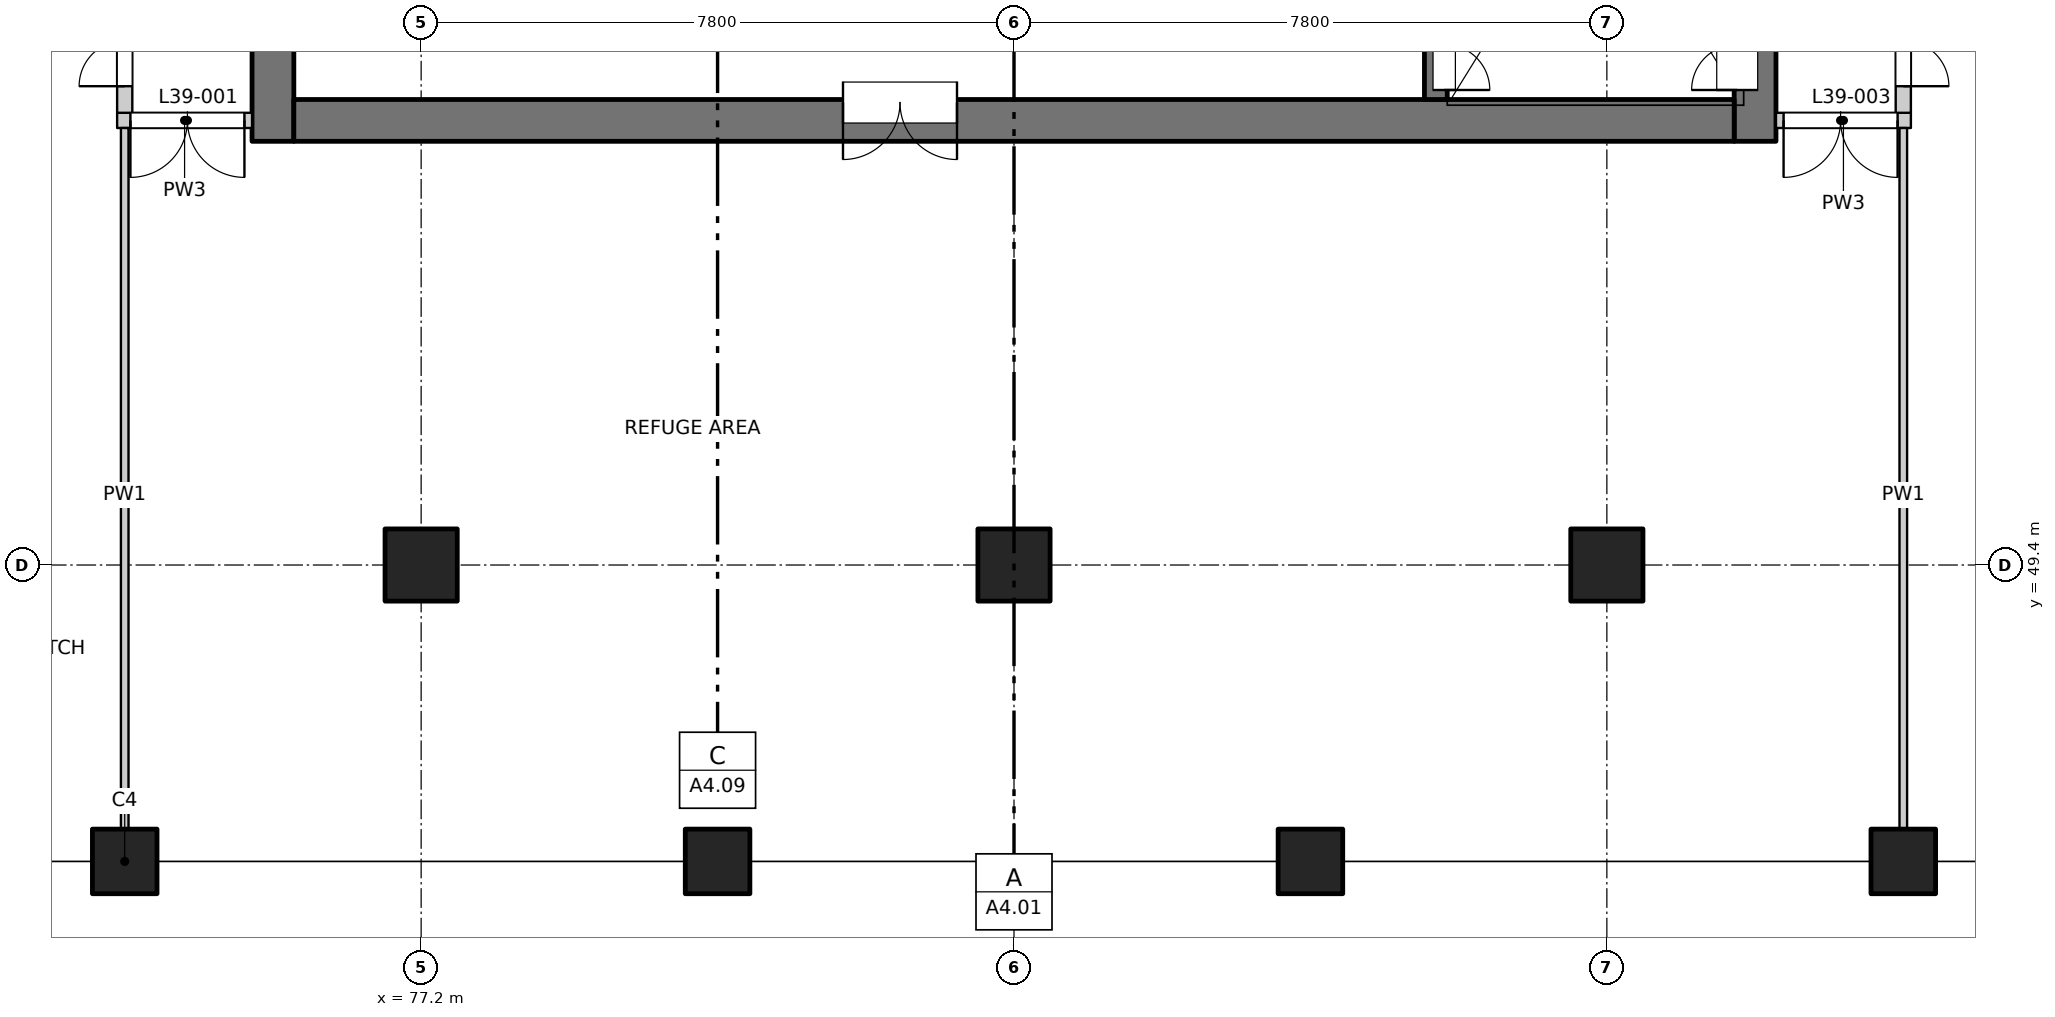
"""IFC4 building model, lengths in metres.
Left out: names, types, materials, properties, quantities, classifications, styles, units other than length and angle.
Written with IfcOpenShell. Run it as: python <this file> out.ifc"""

import sys

from ifc_helpers import new_model, si_unit, direction, frame, frame_2d, origin, origin_2d, place, context, subcontext, project, spatial, rectangle, extrude, element, fill, save


model = new_model("IFC4")
c1 = context("Model", 3, precision=1e-05, world=origin(), true_north=direction((0.0, 1.0)))
c2 = subcontext(c1, "Body", "Model", "MODEL_VIEW")
j1 = project(units=[si_unit("LENGTHUNIT", "METRE"), si_unit("PLANEANGLEUNIT", "RADIAN")], contexts=[c1])
p1 = place(None, origin())
s1 = spatial("IfcSite", under=j1, at=p1, CompositionType="ELEMENT")
p2 = place(p1, origin())
s2 = spatial("IfcBuilding", under=s1, at=p2, CompositionType="ELEMENT")
p3 = place(p2, frame((0.0, 0.0, 144.1)))
s3 = spatial("IfcBuildingStorey", under=s2, at=p3, CompositionType="ELEMENT", Elevation=144.1)
for number, where, z_axis, x_axis in (
    (1, (73.3, 45.5, -0.3), (0.0, 0.0, 1.0), (1.0, 0.0, 0.0)),
    (2, (81.1, 45.5, -0.3), (0.0, 0.0, 1.0), (1.0, 0.0, 0.0)),
    (3, (88.9, 45.5, -0.3), (0.0, 0.0, 1.0), (1.0, 0.0, 0.0)),
    (4, (96.7, 45.5, -0.3), (0.0, 0.0, 1.0), (1.0, 0.0, 0.0)),
):
    element("IfcColumn", number, at=place(p3, frame(where, z_axis=z_axis, x_axis=x_axis)), inside=s3, PredefinedType="COLUMN", context=c2, shape_type="SweptSolid", body=[
        extrude(rectangle(XDim=0.85, YDim=0.85, at=origin_2d()), origin(), (0.0, 0.0, 1.0), 4.5),
    ])
for number, where, z_axis, x_axis in (
    (5, (77.2, 49.4, -0.3), (0.0, 0.0, 1.0), (1.0, 0.0, 0.0)),
    (6, (85.0, 49.4, -0.3), (0.0, 0.0, 1.0), (1.0, 0.0, 0.0)),
    (7, (92.8, 49.4, -0.3), (0.0, 0.0, 1.0), (1.0, 0.0, 0.0)),
):
    element("IfcColumn", number, at=place(p3, frame(where, z_axis=z_axis, x_axis=x_axis)), inside=s3, PredefinedType="COLUMN", context=c2, shape_type="SweptSolid", body=[
        extrude(rectangle(XDim=0.95, YDim=0.95, at=origin_2d()), origin(), (0.0, 0.0, 1.0), 4.5),
    ])
p4 = place(p3, frame((75.25, 54.975, -0.3), z_axis=(0.0, 0.0, 1.0), x_axis=(0.0, 1.0, 0.0)))
e8 = element("IfcWall", 8, at=p4, inside=s3, PredefinedType="SOLIDWALL", context=c2, shape_type="SweptSolid", body=[
    extrude(rectangle(XDim=22.325, YDim=0.55, at=frame_2d((11.163, 0.0))), origin(), (0.0, 0.0, 1.0), 4.5),
])
p5 = place(p4, frame((7.475, 0.0, 0.3)))
e9 = element("IfcOpeningElement", 9, at=p5, cuts=e8, PredefinedType="OPENING", context=c2, shape_type="SweptSolid", body=[
    extrude(rectangle(XDim=0.9, YDim=2.1, at=frame_2d((0.45, 1.05))), frame((0.0, 0.285, 0.0), z_axis=(0.0, -1.0, 0.0), x_axis=(1.0, 0.0, 0.0)), (0.0, 0.0, 1.0), 0.57),
])
p6 = place(p4, frame((12.125, 0.0, 0.3)))
e10 = element("IfcOpeningElement", 10, at=p6, cuts=e8, PredefinedType="OPENING", context=c2, shape_type="SweptSolid", body=[
    extrude(rectangle(XDim=0.9, YDim=2.1, at=frame_2d((0.45, 1.05))), frame((0.0, 0.285, 0.0), z_axis=(0.0, -1.0, 0.0), x_axis=(1.0, 0.0, 0.0)), (0.0, 0.0, 1.0), 0.57),
])
p7 = place(p4, frame((16.625, 0.0, 0.3)))
e11 = element("IfcOpeningElement", 11, at=p7, cuts=e8, PredefinedType="OPENING", context=c2, shape_type="SweptSolid", body=[
    extrude(rectangle(XDim=0.9, YDim=2.1, at=frame_2d((0.45, 1.05))), frame((0.0, 0.285, 0.0), z_axis=(0.0, -1.0, 0.0), x_axis=(1.0, 0.0, 0.0)), (0.0, 0.0, 1.0), 0.57),
])
p8 = place(p4, frame((20.075, 0.0, 0.3)))
e12 = element("IfcOpeningElement", 12, at=p8, cuts=e8, PredefinedType="OPENING", context=c2, shape_type="SweptSolid", body=[
    extrude(rectangle(XDim=0.9, YDim=2.1, at=frame_2d((0.45, 1.05))), frame((0.0, 0.285, 0.0), z_axis=(0.0, -1.0, 0.0), x_axis=(1.0, 0.0, 0.0)), (0.0, 0.0, 1.0), 0.57),
])
p9 = place(p3, frame((94.75, 54.975, -0.3), z_axis=(0.0, 0.0, 1.0), x_axis=(0.0, 1.0, 0.0)))
e13 = element("IfcWall", 13, at=p9, inside=s3, PredefinedType="SOLIDWALL", context=c2, shape_type="SweptSolid", body=[
    extrude(rectangle(XDim=6.975, YDim=0.55, at=frame_2d((3.487, 0.0))), origin(), (0.0, 0.0, 1.0), 4.5),
])
p10 = place(p9, frame((0.675, 0.0, 0.3)))
e14 = element("IfcOpeningElement", 14, at=p10, cuts=e13, PredefinedType="OPENING", context=c2, shape_type="SweptSolid", body=[
    extrude(rectangle(XDim=1.2, YDim=2.1, at=frame_2d((0.6, 1.05))), frame((0.0, 0.285, 0.0), z_axis=(0.0, -1.0, 0.0), x_axis=(1.0, 0.0, 0.0)), (0.0, 0.0, 1.0), 0.57),
])
p11 = place(p3, frame((75.525, 55.25, -0.3), z_axis=(0.0, 0.0, 1.0), x_axis=(1.0, 0.0, 0.0)))
e15 = element("IfcWall", 15, at=p11, inside=s3, PredefinedType="SOLIDWALL", context=c2, shape_type="SweptSolid", body=[
    extrude(rectangle(XDim=18.95, YDim=0.55, at=frame_2d((9.475, 0.0))), origin(), (0.0, 0.0, 1.0), 4.5),
])
p12 = place(p11, frame((7.225, 0.0, 0.3)))
e16 = element("IfcOpeningElement", 16, at=p12, cuts=e15, PredefinedType="OPENING", context=c2, shape_type="SweptSolid", body=[
    extrude(rectangle(XDim=1.5, YDim=2.1, at=frame_2d((0.75, 1.05))), frame((0.0, 0.285, 0.0), z_axis=(0.0, -1.0, 0.0), x_axis=(1.0, 0.0, 0.0)), (0.0, 0.0, 1.0), 0.57),
])
p13 = place(p3, frame((90.55, 55.525, -0.3), z_axis=(0.0, 0.0, 1.0), x_axis=(0.0, 1.0, 0.0)))
e17 = element("IfcWall", 17, at=p13, inside=s3, PredefinedType="SOLIDWALL", context=c2, shape_type="SweptSolid", body=[
    extrude(rectangle(XDim=6.425, YDim=0.3, at=frame_2d((3.212, 0.0))), origin(), (0.0, 0.0, 1.0), 4.5),
])
p14 = place(p13, frame((0.125, 0.0, 0.3)))
e18 = element("IfcOpeningElement", 18, at=p14, cuts=e17, PredefinedType="OPENING", context=c2, shape_type="SweptSolid", body=[
    extrude(rectangle(XDim=1.2, YDim=2.1, at=frame_2d((0.6, 1.05))), frame((0.0, 0.16, 0.0), z_axis=(0.0, -1.0, 0.0), x_axis=(1.0, 0.0, 0.0)), (0.0, 0.0, 1.0), 0.32),
])
p15 = place(p3, frame((73.2, 55.25, 0.0), z_axis=(0.0, 0.0, 1.0), x_axis=(1.0, 0.0, 0.0)))
e19 = element("IfcWall", 19, at=p15, inside=s3, PredefinedType="PARTITIONING", context=c2, shape_type="SweptSolid", body=[
    extrude(rectangle(XDim=1.775, YDim=0.2, at=frame_2d((0.887, 0.0))), origin(), (0.0, 0.0, 1.0), 4.2),
])
p16 = place(p15, frame((0.175, 0.0, 0.0)))
e20 = element("IfcOpeningElement", 20, at=p16, cuts=e19, PredefinedType="OPENING", context=c2, shape_type="SweptSolid", body=[
    extrude(rectangle(XDim=1.5, YDim=2.1, at=frame_2d((0.75, 1.05))), frame((0.0, 0.11, 0.0), z_axis=(0.0, -1.0, 0.0), x_axis=(1.0, 0.0, 0.0)), (0.0, 0.0, 1.0), 0.22),
])
p17 = place(p3, frame((95.025, 55.25, 0.0), z_axis=(0.0, 0.0, 1.0), x_axis=(1.0, 0.0, 0.0)))
e21 = element("IfcWall", 21, at=p17, inside=s3, PredefinedType="PARTITIONING", context=c2, shape_type="SweptSolid", body=[
    extrude(rectangle(XDim=1.775, YDim=0.2, at=frame_2d((0.887, 0.0))), origin(), (0.0, 0.0, 1.0), 4.2),
])
p18 = place(p17, frame((0.1, 0.0, 0.0)))
e22 = element("IfcOpeningElement", 22, at=p18, cuts=e21, PredefinedType="OPENING", context=c2, shape_type="SweptSolid", body=[
    extrude(rectangle(XDim=1.5, YDim=2.1, at=frame_2d((0.75, 1.05))), frame((0.0, 0.11, 0.0), z_axis=(0.0, -1.0, 0.0), x_axis=(1.0, 0.0, 0.0)), (0.0, 0.0, 1.0), 0.22),
])
p19 = place(p3, frame((73.3, 45.5, 0.0), z_axis=(0.0, 0.0, 1.0), x_axis=(0.0, 1.0, 0.0)))
e23 = element("IfcWall", 23, at=p19, inside=s3, PredefinedType="PARTITIONING", context=c2, shape_type="SweptSolid", body=[
    extrude(rectangle(XDim=9.65, YDim=0.1, at=frame_2d((4.825, 0.0))), origin(), (0.0, 0.0, 1.0), 4.2),
])
p20 = place(p3, frame((73.3, 55.35, 0.0), z_axis=(0.0, 0.0, 1.0), x_axis=(0.0, 1.0, 0.0)))
e24 = element("IfcWall", 24, at=p20, inside=s3, PredefinedType="PARTITIONING", context=c2, shape_type="SweptSolid", body=[
    extrude(rectangle(XDim=29.15, YDim=0.2, at=frame_2d((14.575, 0.0))), origin(), (0.0, 0.0, 1.0), 4.2),
])
p21 = place(p20, frame((0.35, 0.0, 0.0)))
e25 = element("IfcOpeningElement", 25, at=p21, cuts=e24, PredefinedType="OPENING", context=c2, shape_type="SweptSolid", body=[
    extrude(rectangle(XDim=1.2, YDim=2.1, at=frame_2d((0.6, 1.05))), frame((0.0, 0.11, 0.0), z_axis=(0.0, -1.0, 0.0), x_axis=(1.0, 0.0, 0.0)), (0.0, 0.0, 1.0), 0.22),
])
p22 = place(p20, frame((3.2, 0.0, 0.0)))
e26 = element("IfcOpeningElement", 26, at=p22, cuts=e24, PredefinedType="OPENING", context=c2, shape_type="SweptSolid", body=[
    extrude(rectangle(XDim=1.2, YDim=2.1, at=frame_2d((0.6, 1.05))), frame((0.0, 0.11, 0.0), z_axis=(0.0, -1.0, 0.0), x_axis=(1.0, 0.0, 0.0)), (0.0, 0.0, 1.0), 0.22),
])
p23 = place(p20, frame((22.7, 0.0, 0.0)))
e27 = element("IfcOpeningElement", 27, at=p23, cuts=e24, PredefinedType="OPENING", context=c2, shape_type="SweptSolid", body=[
    extrude(rectangle(XDim=1.2, YDim=2.1, at=frame_2d((0.6, 1.05))), frame((0.0, 0.11, 0.0), z_axis=(0.0, -1.0, 0.0), x_axis=(1.0, 0.0, 0.0)), (0.0, 0.0, 1.0), 0.22),
])
p24 = place(p20, frame((26.6, 0.0, 0.0)))
e28 = element("IfcOpeningElement", 28, at=p24, cuts=e24, PredefinedType="OPENING", context=c2, shape_type="SweptSolid", body=[
    extrude(rectangle(XDim=1.2, YDim=2.1, at=frame_2d((0.6, 1.05))), frame((0.0, 0.11, 0.0), z_axis=(0.0, -1.0, 0.0), x_axis=(1.0, 0.0, 0.0)), (0.0, 0.0, 1.0), 0.22),
])
p25 = place(p3, frame((96.7, 45.5, 0.0), z_axis=(0.0, 0.0, 1.0), x_axis=(0.0, 1.0, 0.0)))
e29 = element("IfcWall", 29, at=p25, inside=s3, PredefinedType="PARTITIONING", context=c2, shape_type="SweptSolid", body=[
    extrude(rectangle(XDim=9.65, YDim=0.1, at=frame_2d((4.825, 0.0))), origin(), (0.0, 0.0, 1.0), 4.2),
])
p26 = place(p3, frame((96.7, 55.35, 0.0), z_axis=(0.0, 0.0, 1.0), x_axis=(0.0, 1.0, 0.0)))
e30 = element("IfcWall", 30, at=p26, inside=s3, PredefinedType="PARTITIONING", context=c2, shape_type="SweptSolid", body=[
    extrude(rectangle(XDim=29.15, YDim=0.2, at=frame_2d((14.575, 0.0))), origin(), (0.0, 0.0, 1.0), 4.2),
])
p27 = place(p26, frame((0.35, 0.0, 0.0)))
e31 = element("IfcOpeningElement", 31, at=p27, cuts=e30, PredefinedType="OPENING", context=c2, shape_type="SweptSolid", body=[
    extrude(rectangle(XDim=1.2, YDim=2.1, at=frame_2d((0.6, 1.05))), frame((0.0, 0.11, 0.0), z_axis=(0.0, -1.0, 0.0), x_axis=(1.0, 0.0, 0.0)), (0.0, 0.0, 1.0), 0.22),
])
p28 = place(p26, frame((3.2, 0.0, 0.0)))
e32 = element("IfcOpeningElement", 32, at=p28, cuts=e30, PredefinedType="OPENING", context=c2, shape_type="SweptSolid", body=[
    extrude(rectangle(XDim=1.2, YDim=2.1, at=frame_2d((0.6, 1.05))), frame((0.0, 0.11, 0.0), z_axis=(0.0, -1.0, 0.0), x_axis=(1.0, 0.0, 0.0)), (0.0, 0.0, 1.0), 0.22),
])
p29 = place(p26, frame((14.9, 0.0, 0.0)))
e33 = element("IfcOpeningElement", 33, at=p29, cuts=e30, PredefinedType="OPENING", context=c2, shape_type="SweptSolid", body=[
    extrude(rectangle(XDim=1.2, YDim=2.1, at=frame_2d((0.6, 1.05))), frame((0.0, 0.11, 0.0), z_axis=(0.0, -1.0, 0.0), x_axis=(1.0, 0.0, 0.0)), (0.0, 0.0, 1.0), 0.22),
])
p30 = place(p26, frame((26.6, 0.0, 0.0)))
e34 = element("IfcOpeningElement", 34, at=p30, cuts=e30, PredefinedType="OPENING", context=c2, shape_type="SweptSolid", body=[
    extrude(rectangle(XDim=1.2, YDim=2.1, at=frame_2d((0.6, 1.05))), frame((0.0, 0.11, 0.0), z_axis=(0.0, -1.0, 0.0), x_axis=(1.0, 0.0, 0.0)), (0.0, 0.0, 1.0), 0.22),
])
p31 = place(p16, origin())
e35 = element("IfcDoor", 35, at=p31, inside=s3, OperationType="DOUBLE_DOOR_SINGLE_SWING", PredefinedType="DOOR", context=c2, shape_type="SweptSolid", body=[
    extrude(rectangle(XDim=1.5, YDim=2.1, at=frame_2d((0.75, 1.05))), frame((0.0, 0.025, 0.0), z_axis=(0.0, -1.0, 0.0), x_axis=(1.0, 0.0, 0.0)), (0.0, 0.0, 1.0), 0.05),
])
fill(e20, e35)
p32 = place(p12, origin())
e36 = element("IfcDoor", 36, at=p32, inside=s3, OperationType="DOUBLE_DOOR_SINGLE_SWING", PredefinedType="DOOR", context=c2, shape_type="SweptSolid", body=[
    extrude(rectangle(XDim=1.5, YDim=2.1, at=frame_2d((0.75, 1.05))), frame((0.0, 0.26, 0.0), z_axis=(0.0, -1.0, 0.0), x_axis=(1.0, 0.0, 0.0)), (0.0, 0.0, 1.0), 0.05),
])
fill(e16, e36)
p33 = place(p18, origin())
e37 = element("IfcDoor", 37, at=p33, inside=s3, OperationType="DOUBLE_DOOR_SINGLE_SWING", PredefinedType="DOOR", context=c2, shape_type="SweptSolid", body=[
    extrude(rectangle(XDim=1.5, YDim=2.1, at=frame_2d((0.75, 1.05))), frame((0.0, 0.025, 0.0), z_axis=(0.0, -1.0, 0.0), x_axis=(1.0, 0.0, 0.0)), (0.0, 0.0, 1.0), 0.05),
])
fill(e22, e37)
p34 = place(p14, origin())
e38 = element("IfcDoor", 38, at=p34, inside=s3, OperationType="DOUBLE_DOOR_SINGLE_SWING", PredefinedType="DOOR", context=c2, shape_type="SweptSolid", body=[
    extrude(rectangle(XDim=1.2, YDim=2.1, at=frame_2d((0.6, 1.05))), frame((0.0, -0.085, 0.0), z_axis=(0.0, -1.0, 0.0), x_axis=(1.0, 0.0, 0.0)), (0.0, 0.0, 1.0), 0.05),
])
fill(e18, e38)
p35 = place(p10, origin())
e39 = element("IfcDoor", 39, at=p35, inside=s3, OperationType="DOUBLE_DOOR_SINGLE_SWING", PredefinedType="DOOR", context=c2, shape_type="SweptSolid", body=[
    extrude(rectangle(XDim=1.2, YDim=2.1, at=frame_2d((0.6, 1.05))), frame((0.0, 0.26, 0.0), z_axis=(0.0, -1.0, 0.0), x_axis=(1.0, 0.0, 0.0)), (0.0, 0.0, 1.0), 0.05),
])
fill(e14, e39)
p36 = place(p21, origin())
e40 = element("IfcDoor", 40, at=p36, inside=s3, OperationType="DOUBLE_DOOR_SINGLE_SWING", PredefinedType="DOOR", context=c2, shape_type="SweptSolid", body=[
    extrude(rectangle(XDim=1.2, YDim=2.1, at=frame_2d((0.6, 1.05))), frame((0.0, 0.025, 0.0), z_axis=(0.0, -1.0, 0.0), x_axis=(1.0, 0.0, 0.0)), (0.0, 0.0, 1.0), 0.05),
])
fill(e25, e40)
p37 = place(p27, origin())
e41 = element("IfcDoor", 41, at=p37, inside=s3, OperationType="DOUBLE_DOOR_SINGLE_SWING", PredefinedType="DOOR", context=c2, shape_type="SweptSolid", body=[
    extrude(rectangle(XDim=1.2, YDim=2.1, at=frame_2d((0.6, 1.05))), frame((0.0, 0.025, 0.0), z_axis=(0.0, -1.0, 0.0), x_axis=(1.0, 0.0, 0.0)), (0.0, 0.0, 1.0), 0.05),
])
fill(e31, e41)
save(model, sys.argv[1])
